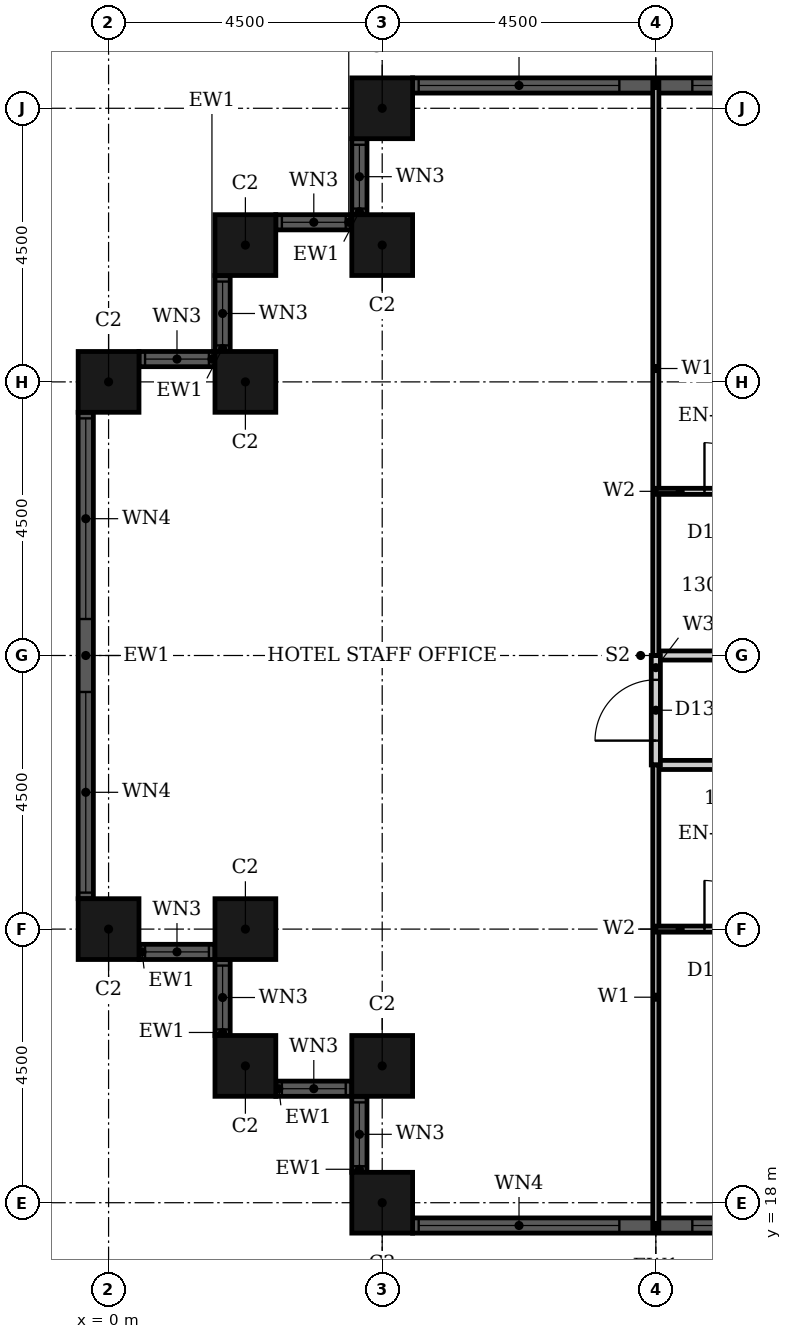
"""IFC4 building model, lengths in metres.
Left out: names, types, materials, properties, quantities, classifications, styles, units other than length and angle.
Written with IfcOpenShell. Run it as: python <this file> out.ifc"""

import sys

from ifc_helpers import new_model, si_unit, direction, frame, frame_2d, origin, origin_2d, place, context, subcontext, project, spatial, rectangle, hollow_rectangle, extrude, element, fill, save


model = new_model("IFC4")
c1 = context("Model", 3, precision=1e-05, world=origin(), true_north=direction((0.0, 1.0)))
c2 = subcontext(c1, "Body", "Model", "MODEL_VIEW")
j1 = project(units=[si_unit("LENGTHUNIT", "METRE"), si_unit("PLANEANGLEUNIT", "RADIAN")], contexts=[c1])
p1 = place(None, origin())
s1 = spatial("IfcSite", under=j1, at=p1, CompositionType="ELEMENT")
p2 = place(p1, origin())
s2 = spatial("IfcBuilding", under=s1, at=p2, CompositionType="ELEMENT")
p3 = place(p2, frame((0.0, 0.0, 60.0)))
s3 = spatial("IfcBuildingStorey", under=s2, at=p3, CompositionType="ELEMENT", Elevation=60.0)
for number, where, z_axis, x_axis in (
    (1, (4.5, 36.0, 0.0), (0.0, 0.0, 1.0), (1.0, 0.0, 0.0)),
    (2, (4.5, 33.75, 0.0), (0.0, 0.0, 1.0), (1.0, 0.0, 0.0)),
    (3, (2.25, 33.75, 0.0), (0.0, 0.0, 1.0), (1.0, 0.0, 0.0)),
    (4, (2.25, 31.5, 0.0), (0.0, 0.0, 1.0), (1.0, 0.0, 0.0)),
    (5, (0.0, 31.5, 0.0), (0.0, 0.0, 1.0), (1.0, 0.0, 0.0)),
    (6, (0.0, 22.5, 0.0), (0.0, 0.0, 1.0), (1.0, 0.0, 0.0)),
    (7, (2.25, 22.5, 0.0), (0.0, 0.0, 1.0), (1.0, 0.0, 0.0)),
    (8, (2.25, 20.25, 0.0), (0.0, 0.0, 1.0), (1.0, 0.0, 0.0)),
    (9, (4.5, 20.25, 0.0), (0.0, 0.0, 1.0), (1.0, 0.0, 0.0)),
    (10, (4.5, 18.0, 0.0), (0.0, 0.0, 1.0), (1.0, 0.0, 0.0)),
):
    element("IfcColumn", number, at=place(p3, frame(where, z_axis=z_axis, x_axis=x_axis)), inside=s3, PredefinedType="COLUMN", context=c2, shape_type="SweptSolid", body=[
        extrude(hollow_rectangle(XDim=1.0, YDim=1.0, WallThickness=0.032, at=origin_2d()), origin(), (0.0, 0.0, 1.0), 3.6),
    ])
p4 = place(p3, frame((13.0, 36.375, 0.0), z_axis=(0.0, 0.0, 1.0), x_axis=(-1.0, 0.0, 0.0)))
e11 = element("IfcWall", 11, at=p4, inside=s3, PredefinedType="SOLIDWALL", context=c2, shape_type="SweptSolid", body=[
    extrude(rectangle(XDim=8.0, YDim=0.25, at=frame_2d((4.0, 0.0))), origin(), (0.0, 0.0, 1.0), 3.6),
])
p5 = place(p4, frame((0.1, 0.0, 0.9)))
e12 = element("IfcOpeningElement", 12, at=p5, cuts=e11, PredefinedType="OPENING", context=c2, shape_type="SweptSolid", body=[
    extrude(rectangle(XDim=3.3, YDim=2.08, at=frame_2d((1.65, 1.04))), frame((0.0, 0.135, 0.0), z_axis=(0.0, -1.0, 0.0), x_axis=(1.0, 0.0, 0.0)), (0.0, 0.0, 1.0), 0.27),
])
p6 = place(p4, frame((4.6, 0.0, 0.9)))
e13 = element("IfcOpeningElement", 13, at=p6, cuts=e11, PredefinedType="OPENING", context=c2, shape_type="SweptSolid", body=[
    extrude(rectangle(XDim=3.3, YDim=2.08, at=frame_2d((1.65, 1.04))), frame((0.0, 0.135, 0.0), z_axis=(0.0, -1.0, 0.0), x_axis=(1.0, 0.0, 0.0)), (0.0, 0.0, 1.0), 0.27),
])
p7 = place(p3, frame((4.125, 35.5, 0.0), z_axis=(0.0, 0.0, 1.0), x_axis=(0.0, -1.0, 0.0)))
e14 = element("IfcWall", 14, at=p7, inside=s3, PredefinedType="SOLIDWALL", context=c2, shape_type="SweptSolid", body=[
    extrude(rectangle(XDim=1.25, YDim=0.25, at=frame_2d((0.625, 0.0))), origin(), (0.0, 0.0, 1.0), 3.6),
])
p8 = place(p7, frame((0.1, 0.0, 0.9)))
e15 = element("IfcOpeningElement", 15, at=p8, cuts=e14, PredefinedType="OPENING", context=c2, shape_type="SweptSolid", body=[
    extrude(rectangle(XDim=1.05, YDim=2.08, at=frame_2d((0.525, 1.04))), frame((0.0, 0.135, 0.0), z_axis=(0.0, -1.0, 0.0), x_axis=(1.0, 0.0, 0.0)), (0.0, 0.0, 1.0), 0.27),
])
p9 = place(p3, frame((4.0, 34.125, 0.0), z_axis=(0.0, 0.0, 1.0), x_axis=(-1.0, 0.0, 0.0)))
e16 = element("IfcWall", 16, at=p9, inside=s3, PredefinedType="SOLIDWALL", context=c2, shape_type="SweptSolid", body=[
    extrude(rectangle(XDim=1.25, YDim=0.25, at=frame_2d((0.625, 0.0))), origin(), (0.0, 0.0, 1.0), 3.6),
])
p10 = place(p9, frame((0.1, 0.0, 0.9)))
e17 = element("IfcOpeningElement", 17, at=p10, cuts=e16, PredefinedType="OPENING", context=c2, shape_type="SweptSolid", body=[
    extrude(rectangle(XDim=1.05, YDim=2.08, at=frame_2d((0.525, 1.04))), frame((0.0, 0.135, 0.0), z_axis=(0.0, -1.0, 0.0), x_axis=(1.0, 0.0, 0.0)), (0.0, 0.0, 1.0), 0.27),
])
p11 = place(p3, frame((1.875, 33.25, 0.0), z_axis=(0.0, 0.0, 1.0), x_axis=(0.0, -1.0, 0.0)))
e18 = element("IfcWall", 18, at=p11, inside=s3, PredefinedType="SOLIDWALL", context=c2, shape_type="SweptSolid", body=[
    extrude(rectangle(XDim=1.25, YDim=0.25, at=frame_2d((0.625, 0.0))), origin(), (0.0, 0.0, 1.0), 3.6),
])
p12 = place(p11, frame((0.1, 0.0, 0.9)))
e19 = element("IfcOpeningElement", 19, at=p12, cuts=e18, PredefinedType="OPENING", context=c2, shape_type="SweptSolid", body=[
    extrude(rectangle(XDim=1.05, YDim=2.08, at=frame_2d((0.525, 1.04))), frame((0.0, 0.135, 0.0), z_axis=(0.0, -1.0, 0.0), x_axis=(1.0, 0.0, 0.0)), (0.0, 0.0, 1.0), 0.27),
])
p13 = place(p3, frame((1.75, 31.875, 0.0), z_axis=(0.0, 0.0, 1.0), x_axis=(-1.0, 0.0, 0.0)))
e20 = element("IfcWall", 20, at=p13, inside=s3, PredefinedType="SOLIDWALL", context=c2, shape_type="SweptSolid", body=[
    extrude(rectangle(XDim=1.25, YDim=0.25, at=frame_2d((0.625, 0.0))), origin(), (0.0, 0.0, 1.0), 3.6),
])
p14 = place(p13, frame((0.1, 0.0, 0.9)))
e21 = element("IfcOpeningElement", 21, at=p14, cuts=e20, PredefinedType="OPENING", context=c2, shape_type="SweptSolid", body=[
    extrude(rectangle(XDim=1.05, YDim=2.08, at=frame_2d((0.525, 1.04))), frame((0.0, 0.135, 0.0), z_axis=(0.0, -1.0, 0.0), x_axis=(1.0, 0.0, 0.0)), (0.0, 0.0, 1.0), 0.27),
])
p15 = place(p3, frame((-0.375, 31.0, 0.0), z_axis=(0.0, 0.0, 1.0), x_axis=(0.0, -1.0, 0.0)))
e22 = element("IfcWall", 22, at=p15, inside=s3, PredefinedType="SOLIDWALL", context=c2, shape_type="SweptSolid", body=[
    extrude(rectangle(XDim=8.0, YDim=0.25, at=frame_2d((4.0, 0.0))), origin(), (0.0, 0.0, 1.0), 3.6),
])
p16 = place(p15, frame((0.1, 0.0, 0.9)))
e23 = element("IfcOpeningElement", 23, at=p16, cuts=e22, PredefinedType="OPENING", context=c2, shape_type="SweptSolid", body=[
    extrude(rectangle(XDim=3.3, YDim=2.08, at=frame_2d((1.65, 1.04))), frame((0.0, 0.135, 0.0), z_axis=(0.0, -1.0, 0.0), x_axis=(1.0, 0.0, 0.0)), (0.0, 0.0, 1.0), 0.27),
])
p17 = place(p15, frame((4.6, 0.0, 0.9)))
e24 = element("IfcOpeningElement", 24, at=p17, cuts=e22, PredefinedType="OPENING", context=c2, shape_type="SweptSolid", body=[
    extrude(rectangle(XDim=3.3, YDim=2.08, at=frame_2d((1.65, 1.04))), frame((0.0, 0.135, 0.0), z_axis=(0.0, -1.0, 0.0), x_axis=(1.0, 0.0, 0.0)), (0.0, 0.0, 1.0), 0.27),
])
p18 = place(p3, frame((0.5, 22.125, 0.0), z_axis=(0.0, 0.0, 1.0), x_axis=(1.0, 0.0, 0.0)))
e25 = element("IfcWall", 25, at=p18, inside=s3, PredefinedType="SOLIDWALL", context=c2, shape_type="SweptSolid", body=[
    extrude(rectangle(XDim=1.25, YDim=0.25, at=frame_2d((0.625, 0.0))), origin(), (0.0, 0.0, 1.0), 3.6),
])
p19 = place(p18, frame((0.1, 0.0, 0.9)))
e26 = element("IfcOpeningElement", 26, at=p19, cuts=e25, PredefinedType="OPENING", context=c2, shape_type="SweptSolid", body=[
    extrude(rectangle(XDim=1.05, YDim=2.08, at=frame_2d((0.525, 1.04))), frame((0.0, 0.135, 0.0), z_axis=(0.0, -1.0, 0.0), x_axis=(1.0, 0.0, 0.0)), (0.0, 0.0, 1.0), 0.27),
])
p20 = place(p3, frame((1.875, 22.0, 0.0), z_axis=(0.0, 0.0, 1.0), x_axis=(0.0, -1.0, 0.0)))
e27 = element("IfcWall", 27, at=p20, inside=s3, PredefinedType="SOLIDWALL", context=c2, shape_type="SweptSolid", body=[
    extrude(rectangle(XDim=1.25, YDim=0.25, at=frame_2d((0.625, 0.0))), origin(), (0.0, 0.0, 1.0), 3.6),
])
p21 = place(p20, frame((0.1, 0.0, 0.9)))
e28 = element("IfcOpeningElement", 28, at=p21, cuts=e27, PredefinedType="OPENING", context=c2, shape_type="SweptSolid", body=[
    extrude(rectangle(XDim=1.05, YDim=2.08, at=frame_2d((0.525, 1.04))), frame((0.0, 0.135, 0.0), z_axis=(0.0, -1.0, 0.0), x_axis=(1.0, 0.0, 0.0)), (0.0, 0.0, 1.0), 0.27),
])
p22 = place(p3, frame((2.75, 19.875, 0.0), z_axis=(0.0, 0.0, 1.0), x_axis=(1.0, 0.0, 0.0)))
e29 = element("IfcWall", 29, at=p22, inside=s3, PredefinedType="SOLIDWALL", context=c2, shape_type="SweptSolid", body=[
    extrude(rectangle(XDim=1.25, YDim=0.25, at=frame_2d((0.625, 0.0))), origin(), (0.0, 0.0, 1.0), 3.6),
])
p23 = place(p22, frame((0.1, 0.0, 0.9)))
e30 = element("IfcOpeningElement", 30, at=p23, cuts=e29, PredefinedType="OPENING", context=c2, shape_type="SweptSolid", body=[
    extrude(rectangle(XDim=1.05, YDim=2.08, at=frame_2d((0.525, 1.04))), frame((0.0, 0.135, 0.0), z_axis=(0.0, -1.0, 0.0), x_axis=(1.0, 0.0, 0.0)), (0.0, 0.0, 1.0), 0.27),
])
p24 = place(p3, frame((4.125, 19.75, 0.0), z_axis=(0.0, 0.0, 1.0), x_axis=(0.0, -1.0, 0.0)))
e31 = element("IfcWall", 31, at=p24, inside=s3, PredefinedType="SOLIDWALL", context=c2, shape_type="SweptSolid", body=[
    extrude(rectangle(XDim=1.25, YDim=0.25, at=frame_2d((0.625, 0.0))), origin(), (0.0, 0.0, 1.0), 3.6),
])
p25 = place(p24, frame((0.1, 0.0, 0.9)))
e32 = element("IfcOpeningElement", 32, at=p25, cuts=e31, PredefinedType="OPENING", context=c2, shape_type="SweptSolid", body=[
    extrude(rectangle(XDim=1.05, YDim=2.08, at=frame_2d((0.525, 1.04))), frame((0.0, 0.135, 0.0), z_axis=(0.0, -1.0, 0.0), x_axis=(1.0, 0.0, 0.0)), (0.0, 0.0, 1.0), 0.27),
])
p26 = place(p3, frame((5.0, 17.625, 0.0), z_axis=(0.0, 0.0, 1.0), x_axis=(1.0, 0.0, 0.0)))
e33 = element("IfcWall", 33, at=p26, inside=s3, PredefinedType="SOLIDWALL", context=c2, shape_type="SweptSolid", body=[
    extrude(rectangle(XDim=8.0, YDim=0.25, at=frame_2d((4.0, 0.0))), origin(), (0.0, 0.0, 1.0), 3.6),
])
p27 = place(p26, frame((0.1, 0.0, 0.9)))
e34 = element("IfcOpeningElement", 34, at=p27, cuts=e33, PredefinedType="OPENING", context=c2, shape_type="SweptSolid", body=[
    extrude(rectangle(XDim=3.3, YDim=2.08, at=frame_2d((1.65, 1.04))), frame((0.0, 0.135, 0.0), z_axis=(0.0, -1.0, 0.0), x_axis=(1.0, 0.0, 0.0)), (0.0, 0.0, 1.0), 0.27),
])
p28 = place(p26, frame((4.6, 0.0, 0.9)))
e35 = element("IfcOpeningElement", 35, at=p28, cuts=e33, PredefinedType="OPENING", context=c2, shape_type="SweptSolid", body=[
    extrude(rectangle(XDim=3.3, YDim=2.08, at=frame_2d((1.65, 1.04))), frame((0.0, 0.135, 0.0), z_axis=(0.0, -1.0, 0.0), x_axis=(1.0, 0.0, 0.0)), (0.0, 0.0, 1.0), 0.27),
])
p29 = place(p3, frame((9.0, 25.2, 0.0), z_axis=(0.0, 0.0, 1.0), x_axis=(1.0, 0.0, 0.0)))
e36 = element("IfcWall", 36, at=p29, inside=s3, PredefinedType="PARTITIONING", context=c2, shape_type="SweptSolid", body=[
    extrude(rectangle(XDim=7.2, YDim=0.15, at=frame_2d((3.6, 0.0))), origin(), (0.0, 0.0, 1.0), 3.3),
])
p30 = place(p29, frame((2.95, 0.0, 0.0)))
e37 = element("IfcOpeningElement", 37, at=p30, cuts=e36, PredefinedType="OPENING", context=c2, shape_type="SweptSolid", body=[
    extrude(rectangle(XDim=1.0, YDim=2.1, at=frame_2d((0.5, 1.05))), frame((0.0, 0.085, 0.0), z_axis=(0.0, -1.0, 0.0), x_axis=(1.0, 0.0, 0.0)), (0.0, 0.0, 1.0), 0.17),
])
p31 = place(p3, frame((9.0, 27.0, 0.0), z_axis=(0.0, 0.0, 1.0), x_axis=(1.0, 0.0, 0.0)))
e38 = element("IfcWall", 38, at=p31, inside=s3, PredefinedType="PARTITIONING", context=c2, shape_type="SweptSolid", body=[
    extrude(rectangle(XDim=7.2, YDim=0.15, at=frame_2d((3.6, 0.0))), origin(), (0.0, 0.0, 1.0), 2.58),
])
p32 = place(p31, frame((2.95, 0.0, 0.0)))
e39 = element("IfcOpeningElement", 39, at=p32, cuts=e38, PredefinedType="OPENING", context=c2, shape_type="SweptSolid", body=[
    extrude(rectangle(XDim=1.0, YDim=2.1, at=frame_2d((0.5, 1.05))), frame((0.0, 0.085, 0.0), z_axis=(0.0, -1.0, 0.0), x_axis=(1.0, 0.0, 0.0)), (0.0, 0.0, 1.0), 0.17),
])
p33 = place(p3, frame((9.0, 25.2, 0.0), z_axis=(0.0, 0.0, 1.0), x_axis=(0.0, 1.0, 0.0)))
e40 = element("IfcWall", 40, at=p33, inside=s3, PredefinedType="PARTITIONING", context=c2, shape_type="SweptSolid", body=[
    extrude(rectangle(XDim=1.8, YDim=0.15, at=frame_2d((0.9, 0.0))), origin(), (0.0, 0.0, 1.0), 3.3),
])
p34 = place(p33, frame((0.4, 0.0, 0.0)))
e41 = element("IfcOpeningElement", 41, at=p34, cuts=e40, PredefinedType="OPENING", context=c2, shape_type="SweptSolid", body=[
    extrude(rectangle(XDim=1.0, YDim=2.1, at=frame_2d((0.5, 1.05))), frame((0.0, 0.085, 0.0), z_axis=(0.0, -1.0, 0.0), x_axis=(1.0, 0.0, 0.0)), (0.0, 0.0, 1.0), 0.17),
])
p35 = place(p3, frame((9.0, 27.0, 0.0), z_axis=(0.0, 0.0, 1.0), x_axis=(0.0, 1.0, 0.0)))
e42 = element("IfcWall", 42, at=p35, inside=s3, PredefinedType="PARTITIONING", context=c2, shape_type="SweptSolid", body=[
    extrude(rectangle(XDim=9.44, YDim=0.1, at=frame_2d((4.72, 0.0))), origin(), (0.0, 0.0, 1.0), 3.3),
])
p36 = place(p3, frame((9.0, 17.56, 0.0), z_axis=(0.0, 0.0, 1.0), x_axis=(0.0, 1.0, 0.0)))
e43 = element("IfcWall", 43, at=p36, inside=s3, PredefinedType="PARTITIONING", context=c2, shape_type="SweptSolid", body=[
    extrude(rectangle(XDim=7.64, YDim=0.1, at=frame_2d((3.82, 0.0))), origin(), (0.0, 0.0, 1.0), 3.3),
])
p37 = place(p3, frame((9.0, 22.5, 0.0), z_axis=(0.0, 0.0, 1.0), x_axis=(1.0, 0.0, 0.0)))
e44 = element("IfcWall", 44, at=p37, inside=s3, PredefinedType="PARTITIONING", context=c2, shape_type="SweptSolid", body=[
    extrude(rectangle(XDim=2.4, YDim=0.1, at=frame_2d((1.2, 0.0))), origin(), (0.0, 0.0, 1.0), 2.58),
])
p38 = place(p37, frame((0.8, 0.0, 0.0)))
e45 = element("IfcOpeningElement", 45, at=p38, cuts=e44, PredefinedType="OPENING", context=c2, shape_type="SweptSolid", body=[
    extrude(rectangle(XDim=0.8, YDim=2.1, at=frame_2d((0.4, 1.05))), frame((0.0, 0.06, 0.0), z_axis=(0.0, -1.0, 0.0), x_axis=(1.0, 0.0, 0.0)), (0.0, 0.0, 1.0), 0.12),
])
p39 = place(p3, frame((9.0, 29.7, 0.0), z_axis=(0.0, 0.0, 1.0), x_axis=(1.0, 0.0, 0.0)))
e46 = element("IfcWall", 46, at=p39, inside=s3, PredefinedType="PARTITIONING", context=c2, shape_type="SweptSolid", body=[
    extrude(rectangle(XDim=2.4, YDim=0.1, at=frame_2d((1.2, 0.0))), origin(), (0.0, 0.0, 1.0), 3.3),
])
p40 = place(p39, frame((0.8, 0.0, 0.0)))
e47 = element("IfcOpeningElement", 47, at=p40, cuts=e46, PredefinedType="OPENING", context=c2, shape_type="SweptSolid", body=[
    extrude(rectangle(XDim=0.8, YDim=2.1, at=frame_2d((0.4, 1.05))), frame((0.0, 0.06, 0.0), z_axis=(0.0, -1.0, 0.0), x_axis=(1.0, 0.0, 0.0)), (0.0, 0.0, 1.0), 0.12),
])
p41 = place(p5, origin())
e48 = element("IfcWindow", 48, at=p41, inside=s3, PartitioningType="SINGLE_PANEL", PredefinedType="WINDOW", context=c2, shape_type="SweptSolid", body=[
    extrude(rectangle(XDim=3.3, YDim=2.08, at=frame_2d((1.65, 1.04))), frame((0.0, 0.03, 0.0), z_axis=(0.0, -1.0, 0.0), x_axis=(1.0, 0.0, 0.0)), (0.0, 0.0, 1.0), 0.06),
])
fill(e12, e48)
p42 = place(p6, origin())
e49 = element("IfcWindow", 49, at=p42, inside=s3, PartitioningType="SINGLE_PANEL", PredefinedType="WINDOW", context=c2, shape_type="SweptSolid", body=[
    extrude(rectangle(XDim=3.3, YDim=2.08, at=frame_2d((1.65, 1.04))), frame((0.0, 0.03, 0.0), z_axis=(0.0, -1.0, 0.0), x_axis=(1.0, 0.0, 0.0)), (0.0, 0.0, 1.0), 0.06),
])
fill(e13, e49)
p43 = place(p8, origin())
e50 = element("IfcWindow", 50, at=p43, inside=s3, PartitioningType="SINGLE_PANEL", PredefinedType="WINDOW", context=c2, shape_type="SweptSolid", body=[
    extrude(rectangle(XDim=1.05, YDim=2.08, at=frame_2d((0.525, 1.04))), frame((0.0, 0.03, 0.0), z_axis=(0.0, -1.0, 0.0), x_axis=(1.0, 0.0, 0.0)), (0.0, 0.0, 1.0), 0.06),
])
fill(e15, e50)
p44 = place(p10, origin())
e51 = element("IfcWindow", 51, at=p44, inside=s3, PartitioningType="SINGLE_PANEL", PredefinedType="WINDOW", context=c2, shape_type="SweptSolid", body=[
    extrude(rectangle(XDim=1.05, YDim=2.08, at=frame_2d((0.525, 1.04))), frame((0.0, 0.03, 0.0), z_axis=(0.0, -1.0, 0.0), x_axis=(1.0, 0.0, 0.0)), (0.0, 0.0, 1.0), 0.06),
])
fill(e17, e51)
p45 = place(p12, origin())
e52 = element("IfcWindow", 52, at=p45, inside=s3, PartitioningType="SINGLE_PANEL", PredefinedType="WINDOW", context=c2, shape_type="SweptSolid", body=[
    extrude(rectangle(XDim=1.05, YDim=2.08, at=frame_2d((0.525, 1.04))), frame((0.0, 0.03, 0.0), z_axis=(0.0, -1.0, 0.0), x_axis=(1.0, 0.0, 0.0)), (0.0, 0.0, 1.0), 0.06),
])
fill(e19, e52)
p46 = place(p14, origin())
e53 = element("IfcWindow", 53, at=p46, inside=s3, PartitioningType="SINGLE_PANEL", PredefinedType="WINDOW", context=c2, shape_type="SweptSolid", body=[
    extrude(rectangle(XDim=1.05, YDim=2.08, at=frame_2d((0.525, 1.04))), frame((0.0, 0.03, 0.0), z_axis=(0.0, -1.0, 0.0), x_axis=(1.0, 0.0, 0.0)), (0.0, 0.0, 1.0), 0.06),
])
fill(e21, e53)
p47 = place(p16, origin())
e54 = element("IfcWindow", 54, at=p47, inside=s3, PartitioningType="SINGLE_PANEL", PredefinedType="WINDOW", context=c2, shape_type="SweptSolid", body=[
    extrude(rectangle(XDim=3.3, YDim=2.08, at=frame_2d((1.65, 1.04))), frame((0.0, 0.03, 0.0), z_axis=(0.0, -1.0, 0.0), x_axis=(1.0, 0.0, 0.0)), (0.0, 0.0, 1.0), 0.06),
])
fill(e23, e54)
p48 = place(p17, origin())
e55 = element("IfcWindow", 55, at=p48, inside=s3, PartitioningType="SINGLE_PANEL", PredefinedType="WINDOW", context=c2, shape_type="SweptSolid", body=[
    extrude(rectangle(XDim=3.3, YDim=2.08, at=frame_2d((1.65, 1.04))), frame((0.0, 0.03, 0.0), z_axis=(0.0, -1.0, 0.0), x_axis=(1.0, 0.0, 0.0)), (0.0, 0.0, 1.0), 0.06),
])
fill(e24, e55)
p49 = place(p19, origin())
e56 = element("IfcWindow", 56, at=p49, inside=s3, PartitioningType="SINGLE_PANEL", PredefinedType="WINDOW", context=c2, shape_type="SweptSolid", body=[
    extrude(rectangle(XDim=1.05, YDim=2.08, at=frame_2d((0.525, 1.04))), frame((0.0, 0.03, 0.0), z_axis=(0.0, -1.0, 0.0), x_axis=(1.0, 0.0, 0.0)), (0.0, 0.0, 1.0), 0.06),
])
fill(e26, e56)
p50 = place(p21, origin())
e57 = element("IfcWindow", 57, at=p50, inside=s3, PartitioningType="SINGLE_PANEL", PredefinedType="WINDOW", context=c2, shape_type="SweptSolid", body=[
    extrude(rectangle(XDim=1.05, YDim=2.08, at=frame_2d((0.525, 1.04))), frame((0.0, 0.03, 0.0), z_axis=(0.0, -1.0, 0.0), x_axis=(1.0, 0.0, 0.0)), (0.0, 0.0, 1.0), 0.06),
])
fill(e28, e57)
p51 = place(p23, origin())
e58 = element("IfcWindow", 58, at=p51, inside=s3, PartitioningType="SINGLE_PANEL", PredefinedType="WINDOW", context=c2, shape_type="SweptSolid", body=[
    extrude(rectangle(XDim=1.05, YDim=2.08, at=frame_2d((0.525, 1.04))), frame((0.0, 0.03, 0.0), z_axis=(0.0, -1.0, 0.0), x_axis=(1.0, 0.0, 0.0)), (0.0, 0.0, 1.0), 0.06),
])
fill(e30, e58)
p52 = place(p25, origin())
e59 = element("IfcWindow", 59, at=p52, inside=s3, PartitioningType="SINGLE_PANEL", PredefinedType="WINDOW", context=c2, shape_type="SweptSolid", body=[
    extrude(rectangle(XDim=1.05, YDim=2.08, at=frame_2d((0.525, 1.04))), frame((0.0, 0.03, 0.0), z_axis=(0.0, -1.0, 0.0), x_axis=(1.0, 0.0, 0.0)), (0.0, 0.0, 1.0), 0.06),
])
fill(e32, e59)
p53 = place(p27, origin())
e60 = element("IfcWindow", 60, at=p53, inside=s3, PartitioningType="SINGLE_PANEL", PredefinedType="WINDOW", context=c2, shape_type="SweptSolid", body=[
    extrude(rectangle(XDim=3.3, YDim=2.08, at=frame_2d((1.65, 1.04))), frame((0.0, 0.03, 0.0), z_axis=(0.0, -1.0, 0.0), x_axis=(1.0, 0.0, 0.0)), (0.0, 0.0, 1.0), 0.06),
])
fill(e34, e60)
p54 = place(p28, origin())
e61 = element("IfcWindow", 61, at=p54, inside=s3, PartitioningType="SINGLE_PANEL", PredefinedType="WINDOW", context=c2, shape_type="SweptSolid", body=[
    extrude(rectangle(XDim=3.3, YDim=2.08, at=frame_2d((1.65, 1.04))), frame((0.0, 0.03, 0.0), z_axis=(0.0, -1.0, 0.0), x_axis=(1.0, 0.0, 0.0)), (0.0, 0.0, 1.0), 0.06),
])
fill(e35, e61)
p55 = place(p38, origin())
e62 = element("IfcDoor", 62, at=p55, inside=s3, OperationType="SINGLE_SWING_RIGHT", PredefinedType="DOOR", context=c2, shape_type="SweptSolid", body=[
    extrude(rectangle(XDim=0.8, YDim=2.1, at=frame_2d((0.4, 1.05))), frame((0.0, 0.025, 0.0), z_axis=(0.0, -1.0, 0.0), x_axis=(1.0, 0.0, 0.0)), (0.0, 0.0, 1.0), 0.05),
])
fill(e45, e62)
p56 = place(p40, origin())
e63 = element("IfcDoor", 63, at=p56, inside=s3, OperationType="SINGLE_SWING_LEFT", PredefinedType="DOOR", context=c2, shape_type="SweptSolid", body=[
    extrude(rectangle(XDim=0.8, YDim=2.1, at=frame_2d((0.4, 1.05))), frame((0.0, 0.025, 0.0), z_axis=(0.0, -1.0, 0.0), x_axis=(1.0, 0.0, 0.0)), (0.0, 0.0, 1.0), 0.05),
])
fill(e47, e63)
p57 = place(p34, origin())
e64 = element("IfcDoor", 64, at=p57, inside=s3, OperationType="SINGLE_SWING_RIGHT", PredefinedType="DOOR", context=c2, shape_type="SweptSolid", body=[
    extrude(rectangle(XDim=1.0, YDim=2.1, at=frame_2d((0.5, 1.05))), frame((0.0, 0.025, 0.0), z_axis=(0.0, -1.0, 0.0), x_axis=(1.0, 0.0, 0.0)), (0.0, 0.0, 1.0), 0.05),
])
fill(e41, e64)
save(model, sys.argv[1])
